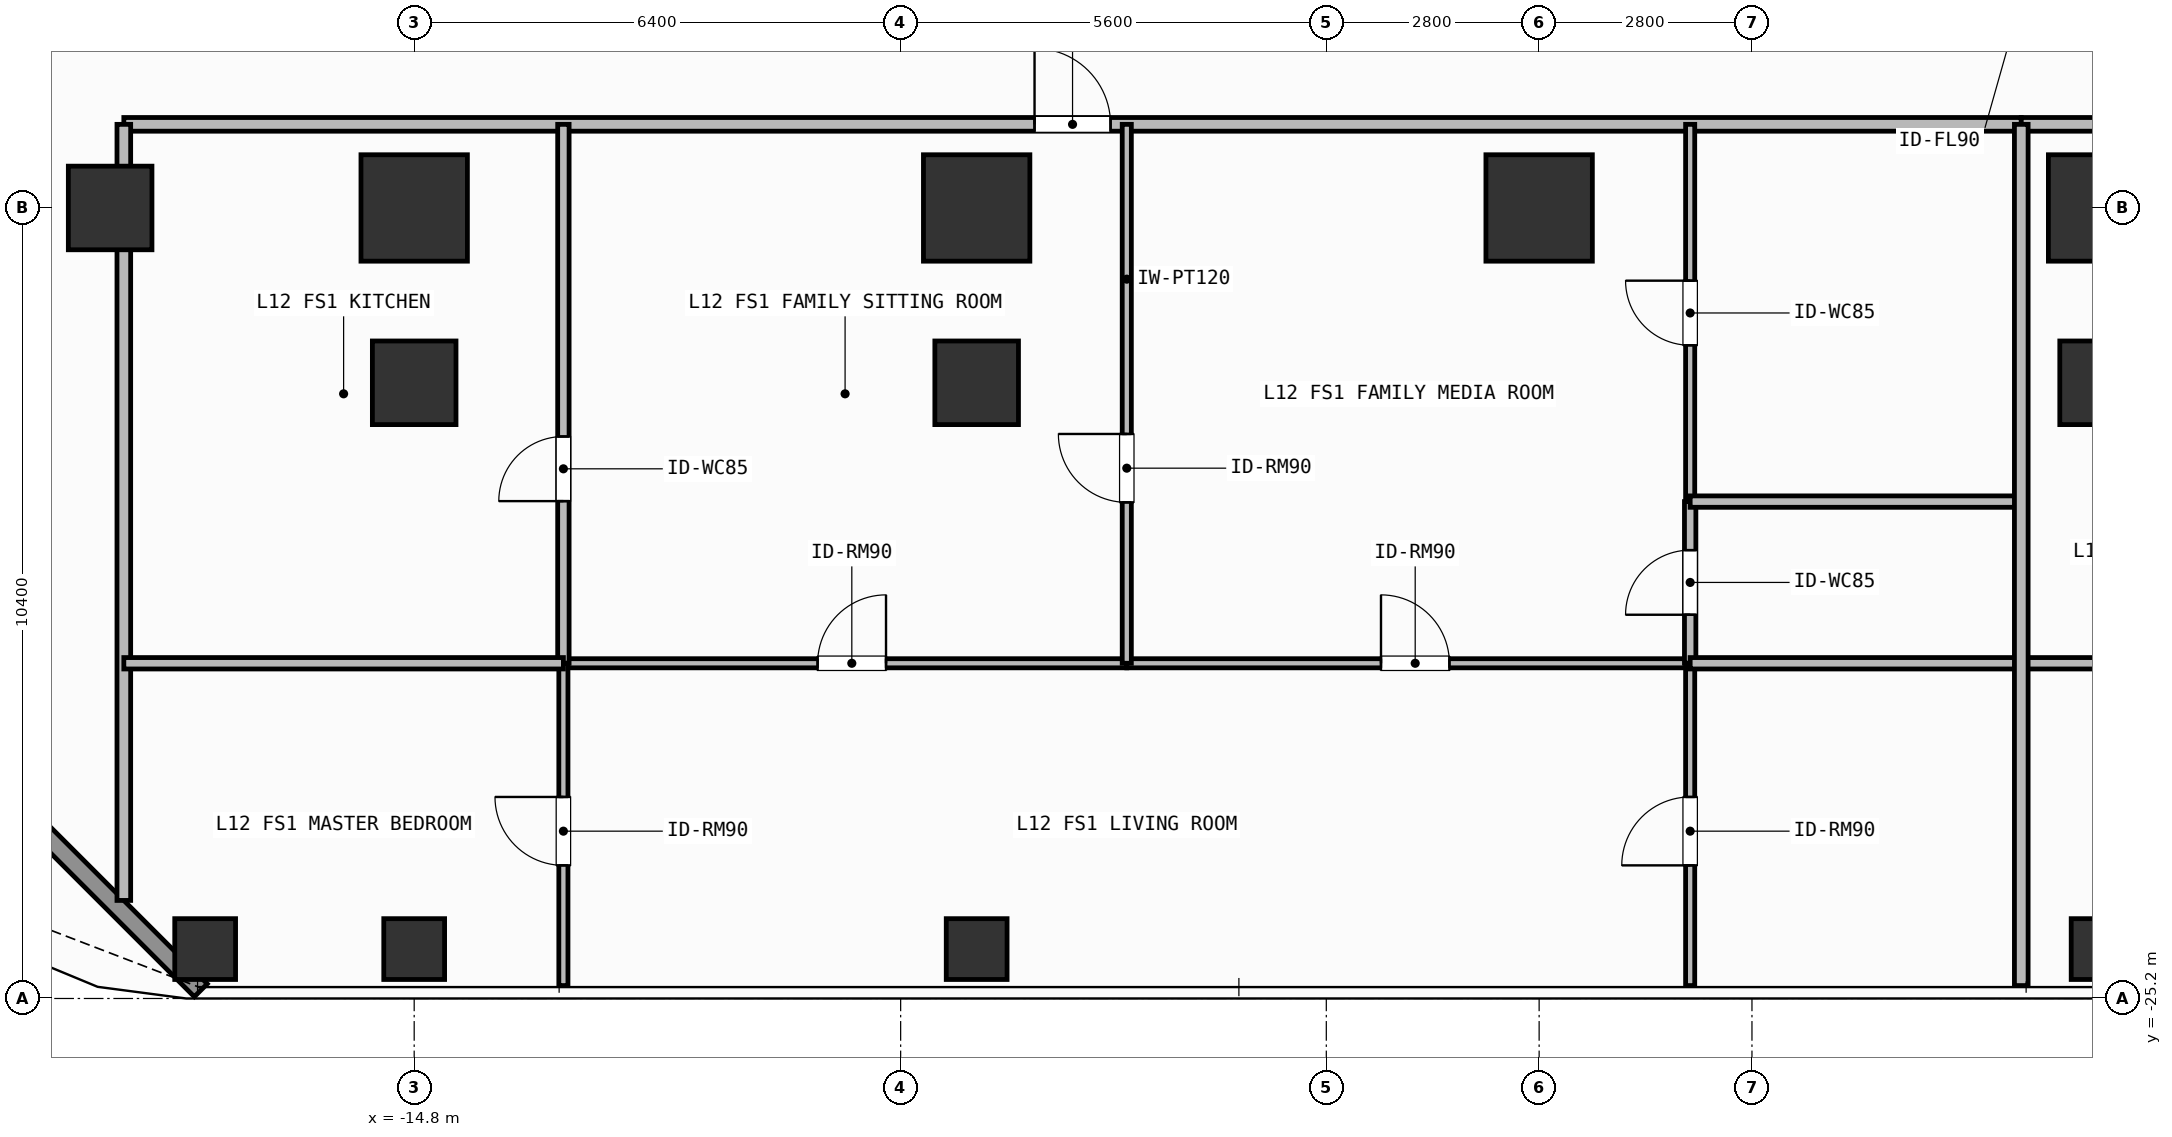
"""IFC4 building model, lengths in metres.
Left out: names, types, materials, properties, quantities, classifications, styles, units other than length and angle.
Written with IfcOpenShell. Run it as: python <this file> out.ifc"""

import sys

from ifc_helpers import new_model, si_unit, direction, frame, frame_2d, origin, origin_2d, place, context, subcontext, project, spatial, rectangle, hollow_rectangle, extrude, element, fill, save


model = new_model("IFC4")
c1 = context("Model", 3, precision=1e-05, world=origin(), true_north=direction((0.0, 1.0)))
c2 = subcontext(c1, "Body", "Model", "MODEL_VIEW")
j1 = project(units=[si_unit("LENGTHUNIT", "METRE"), si_unit("PLANEANGLEUNIT", "RADIAN")], contexts=[c1])
p1 = place(None, origin())
s1 = spatial("IfcSite", under=j1, at=p1, CompositionType="ELEMENT")
p2 = place(p1, origin())
s2 = spatial("IfcBuilding", under=s1, at=p2, CompositionType="ELEMENT")
p3 = place(p2, frame((0.0, 0.0, 46.2)))
s3 = spatial("IfcBuildingStorey", under=s2, at=p3, CompositionType="ELEMENT", Elevation=46.2)
for number, where, z_axis, x_axis in (
    (1, (-14.8, -14.8, 0.0), (0.0, 0.0, 1.0), (1.0, 0.0, 0.0)),
    (2, (-7.4, -14.8, 0.0), (0.0, 0.0, 1.0), (1.0, 0.0, 0.0)),
    (3, (0.0, -14.8, 0.0), (0.0, 0.0, 1.0), (1.0, 0.0, 0.0)),
    (4, (7.4, -14.8, 0.0), (0.0, 0.0, 1.0), (1.0, 0.0, 0.0)),
):
    element("IfcColumn", number, at=place(p3, frame(where, z_axis=z_axis, x_axis=x_axis)), inside=s3, PredefinedType="COLUMN", context=c2, shape_type="SweptSolid", body=[
        extrude(rectangle(XDim=1.4, YDim=1.4, at=origin_2d()), origin(), (0.0, 0.0, 1.0), 3.9),
    ])
for number, where, z_axis, x_axis in (
    (5, (-18.8, -14.8, 0.0), (0.0, 0.0, 1.0), (1.0, 0.0, 0.0)),
    (6, (-14.8, -17.1, 0.0), (0.0, 0.0, 1.0), (1.0, 0.0, 0.0)),
    (7, (-7.4, -17.1, 0.0), (0.0, 0.0, 1.0), (1.0, 0.0, 0.0)),
    (8, (7.4, -17.1, 0.0), (0.0, 0.0, 1.0), (1.0, 0.0, 0.0)),
):
    element("IfcColumn", number, at=place(p3, frame(where, z_axis=z_axis, x_axis=x_axis)), inside=s3, PredefinedType="COLUMN", context=c2, shape_type="SweptSolid", body=[
        extrude(rectangle(XDim=1.1, YDim=1.1, at=origin_2d()), origin(), (0.0, 0.0, 1.0), 3.9),
    ])
for number, where, z_axis, x_axis in (
    (9, (-17.55, -24.55, 0.0), (0.0, 0.0, 1.0), (1.0, 0.0, 0.0)),
    (10, (-14.8, -24.55, 0.0), (0.0, 0.0, 1.0), (1.0, 0.0, 0.0)),
    (11, (-7.4, -24.55, 0.0), (0.0, 0.0, 1.0), (1.0, 0.0, 0.0)),
    (12, (7.4, -24.55, 0.0), (0.0, 0.0, 1.0), (1.0, 0.0, 0.0)),
):
    element("IfcColumn", number, at=place(p3, frame(where, z_axis=z_axis, x_axis=x_axis)), inside=s3, PredefinedType="COLUMN", context=c2, shape_type="SweptSolid", body=[
        extrude(hollow_rectangle(XDim=0.8, YDim=0.8, WallThickness=0.036, at=origin_2d()), origin(), (0.0, 0.0, 1.0), 3.9),
    ])
p4 = place(p3, frame((-17.608, -25.092, 0.0), z_axis=(0.0, 0.0, 1.0), x_axis=(-0.707106781187, 0.707106781187, 0.0)))
e13 = element("IfcWall", 13, at=p4, inside=s3, PredefinedType="SOLIDWALL", context=c2, shape_type="SweptSolid", body=[
    extrude(rectangle(XDim=6.484, YDim=0.24, at=frame_2d((3.242, 0.0))), origin(), (0.0, 0.0, 1.0), 3.68),
])
p5 = place(p3, frame((-18.62, -13.7, 0.0), z_axis=(0.0, 0.0, 1.0), x_axis=(1.0, 0.0, 0.0)))
e14 = element("IfcWall", 14, at=p5, inside=s3, PredefinedType="PARTITIONING", context=c2, shape_type="SweptSolid", body=[
    extrude(rectangle(XDim=24.963, YDim=0.18, at=frame_2d((12.481, 0.0))), origin(), (0.0, 0.0, 1.0), 3.68),
])
p6 = place(p5, frame((11.981, 0.0, 0.0)))
e15 = element("IfcOpeningElement", 15, at=p6, cuts=e14, PredefinedType="OPENING", context=c2, shape_type="SweptSolid", body=[
    extrude(rectangle(XDim=1.0, YDim=2.2, at=frame_2d((0.5, 1.1))), frame((0.0, 0.1, 0.0), z_axis=(0.0, -1.0, 0.0), x_axis=(1.0, 0.0, 0.0)), (0.0, 0.0, 1.0), 0.2),
])
p7 = place(p3, frame((-12.837, -20.79, 0.0), z_axis=(0.0, 0.0, 1.0), x_axis=(1.0, 0.0, 0.0)))
e16 = element("IfcWall", 16, at=p7, inside=s3, PredefinedType="PARTITIONING", context=c2, shape_type="SweptSolid", body=[
    extrude(rectangle(XDim=7.412, YDim=0.12, at=frame_2d((3.706, 0.0))), origin(), (0.0, 0.0, 1.0), 3.68),
])
p8 = place(p7, frame((3.344, 0.0, 0.0)))
e17 = element("IfcOpeningElement", 17, at=p8, cuts=e16, PredefinedType="OPENING", context=c2, shape_type="SweptSolid", body=[
    extrude(rectangle(XDim=0.9, YDim=2.1, at=frame_2d((0.45, 1.05))), frame((0.0, 0.07, 0.0), z_axis=(0.0, -1.0, 0.0), x_axis=(1.0, 0.0, 0.0)), (0.0, 0.0, 1.0), 0.14),
])
p9 = place(p3, frame((-5.425, -20.79, 0.0), z_axis=(0.0, 0.0, 1.0), x_axis=(1.0, 0.0, 0.0)))
e18 = element("IfcWall", 18, at=p9, inside=s3, PredefinedType="PARTITIONING", context=c2, shape_type="SweptSolid", body=[
    extrude(rectangle(XDim=7.412, YDim=0.12, at=frame_2d((3.706, 0.0))), origin(), (0.0, 0.0, 1.0), 3.68),
])
p10 = place(p9, frame((3.344, 0.0, 0.0)))
e19 = element("IfcOpeningElement", 19, at=p10, cuts=e18, PredefinedType="OPENING", context=c2, shape_type="SweptSolid", body=[
    extrude(rectangle(XDim=0.9, YDim=2.1, at=frame_2d((0.45, 1.05))), frame((0.0, 0.07, 0.0), z_axis=(0.0, -1.0, 0.0), x_axis=(1.0, 0.0, 0.0)), (0.0, 0.0, 1.0), 0.14),
])
p11 = place(p3, frame((-5.425, -20.79, 0.0), z_axis=(0.0, 0.0, 1.0), x_axis=(0.0, 1.0, 0.0)))
e20 = element("IfcWall", 20, at=p11, inside=s3, PredefinedType="PARTITIONING", context=c2, shape_type="SweptSolid", body=[
    extrude(rectangle(XDim=7.09, YDim=0.12, at=frame_2d((3.545, 0.0))), origin(), (0.0, 0.0, 1.0), 3.68),
])
p12 = place(p11, frame((2.117, 0.0, 0.0)))
e21 = element("IfcOpeningElement", 21, at=p12, cuts=e20, PredefinedType="OPENING", context=c2, shape_type="SweptSolid", body=[
    extrude(rectangle(XDim=0.9, YDim=2.1, at=frame_2d((0.45, 1.05))), frame((0.0, 0.07, 0.0), z_axis=(0.0, -1.0, 0.0), x_axis=(1.0, 0.0, 0.0)), (0.0, 0.0, 1.0), 0.14),
])
p13 = place(p3, frame((-12.837, -20.79, 0.0), z_axis=(0.0, 0.0, 1.0), x_axis=(0.0, 1.0, 0.0)))
e22 = element("IfcWall", 22, at=p13, inside=s3, PredefinedType="PARTITIONING", context=c2, shape_type="SweptSolid", body=[
    extrude(rectangle(XDim=7.09, YDim=0.15, at=frame_2d((3.545, 0.0))), origin(), (0.0, 0.0, 1.0), 3.68),
])
p14 = place(p13, frame((2.133, 0.0, 0.0)))
e23 = element("IfcOpeningElement", 23, at=p14, cuts=e22, PredefinedType="OPENING", context=c2, shape_type="SweptSolid", body=[
    extrude(rectangle(XDim=0.85, YDim=2.1, at=frame_2d((0.425, 1.05))), frame((0.0, 0.085, 0.0), z_axis=(0.0, -1.0, 0.0), x_axis=(1.0, 0.0, 0.0)), (0.0, 0.0, 1.0), 0.17),
])
p15 = place(p3, frame((-12.837, -25.03, 0.0), z_axis=(0.0, 0.0, 1.0), x_axis=(0.0, 1.0, 0.0)))
e24 = element("IfcWall", 24, at=p15, inside=s3, PredefinedType="PARTITIONING", context=c2, shape_type="SweptSolid", body=[
    extrude(rectangle(XDim=4.24, YDim=0.12, at=frame_2d((2.12, 0.0))), origin(), (0.0, 0.0, 1.0), 3.68),
])
p16 = place(p15, frame((1.581, 0.0, 0.0)))
e25 = element("IfcOpeningElement", 25, at=p16, cuts=e24, PredefinedType="OPENING", context=c2, shape_type="SweptSolid", body=[
    extrude(rectangle(XDim=0.9, YDim=2.1, at=frame_2d((0.45, 1.05))), frame((0.0, 0.07, 0.0), z_axis=(0.0, -1.0, 0.0), x_axis=(1.0, 0.0, 0.0)), (0.0, 0.0, 1.0), 0.14),
])
p17 = place(p3, frame((1.987, -20.79, 0.0), z_axis=(0.0, 0.0, 1.0), x_axis=(0.0, 1.0, 0.0)))
e26 = element("IfcWall", 26, at=p17, inside=s3, PredefinedType="PARTITIONING", context=c2, shape_type="SweptSolid", body=[
    extrude(rectangle(XDim=2.127, YDim=0.15, at=frame_2d((1.063, 0.0))), origin(), (0.0, 0.0, 1.0), 3.68),
])
p18 = place(p17, frame((0.638, 0.0, 0.0)))
e27 = element("IfcOpeningElement", 27, at=p18, cuts=e26, PredefinedType="OPENING", context=c2, shape_type="SweptSolid", body=[
    extrude(rectangle(XDim=0.85, YDim=2.1, at=frame_2d((0.425, 1.05))), frame((0.0, 0.085, 0.0), z_axis=(0.0, -1.0, 0.0), x_axis=(1.0, 0.0, 0.0)), (0.0, 0.0, 1.0), 0.17),
])
p19 = place(p3, frame((1.987, -18.663, 0.0), z_axis=(0.0, 0.0, 1.0), x_axis=(0.0, 1.0, 0.0)))
e28 = element("IfcWall", 28, at=p19, inside=s3, PredefinedType="PARTITIONING", context=c2, shape_type="SweptSolid", body=[
    extrude(rectangle(XDim=4.963, YDim=0.12, at=frame_2d((2.481, 0.0))), origin(), (0.0, 0.0, 1.0), 3.68),
])
p20 = place(p19, frame((2.056, 0.0, 0.0)))
e29 = element("IfcOpeningElement", 29, at=p20, cuts=e28, PredefinedType="OPENING", context=c2, shape_type="SweptSolid", body=[
    extrude(rectangle(XDim=0.85, YDim=2.1, at=frame_2d((0.425, 1.05))), frame((0.0, 0.07, 0.0), z_axis=(0.0, -1.0, 0.0), x_axis=(1.0, 0.0, 0.0)), (0.0, 0.0, 1.0), 0.14),
])
p21 = place(p3, frame((1.987, -25.03, 0.0), z_axis=(0.0, 0.0, 1.0), x_axis=(0.0, 1.0, 0.0)))
e30 = element("IfcWall", 30, at=p21, inside=s3, PredefinedType="PARTITIONING", context=c2, shape_type="SweptSolid", body=[
    extrude(rectangle(XDim=4.24, YDim=0.12, at=frame_2d((2.12, 0.0))), origin(), (0.0, 0.0, 1.0), 3.68),
])
p22 = place(p21, frame((1.581, 0.0, 0.0)))
e31 = element("IfcOpeningElement", 31, at=p22, cuts=e30, PredefinedType="OPENING", context=c2, shape_type="SweptSolid", body=[
    extrude(rectangle(XDim=0.9, YDim=2.1, at=frame_2d((0.45, 1.05))), frame((0.0, 0.07, 0.0), z_axis=(0.0, -1.0, 0.0), x_axis=(1.0, 0.0, 0.0)), (0.0, 0.0, 1.0), 0.14),
])
p23 = place(p3, frame((6.343, -13.7, 0.0), z_axis=(0.0, 0.0, 1.0), x_axis=(1.0, 0.0, 0.0)))
e32 = element("IfcWall", 32, at=p23, inside=s3, PredefinedType="PARTITIONING", context=c2, shape_type="SweptSolid", body=[
    extrude(rectangle(XDim=18.077, YDim=0.18, at=frame_2d((9.039, 0.0))), origin(), (0.0, 0.0, 1.0), 3.68),
])
p24 = place(p23, frame((9.252, 0.0, 0.0)))
e33 = element("IfcOpeningElement", 33, at=p24, cuts=e32, PredefinedType="OPENING", context=c2, shape_type="SweptSolid", body=[
    extrude(rectangle(XDim=1.0, YDim=2.2, at=frame_2d((0.5, 1.1))), frame((0.0, 0.1, 0.0), z_axis=(0.0, -1.0, 0.0), x_axis=(1.0, 0.0, 0.0)), (0.0, 0.0, 1.0), 0.2),
])
p25 = place(p3, frame((-18.62, -23.91, 0.0), z_axis=(0.0, 0.0, 1.0), x_axis=(0.0, 1.0, 0.0)))
e34 = element("IfcWall", 34, at=p25, inside=s3, PredefinedType="PARTITIONING", context=c2, shape_type="SweptSolid", body=[
    extrude(rectangle(XDim=10.21, YDim=0.18, at=frame_2d((5.105, 0.0))), origin(), (0.0, 0.0, 1.0), 3.082),
])
p26 = place(p3, frame((-18.62, -20.79, 0.0), z_axis=(0.0, 0.0, 1.0), x_axis=(1.0, 0.0, 0.0)))
e35 = element("IfcWall", 35, at=p26, inside=s3, PredefinedType="PARTITIONING", context=c2, shape_type="SweptSolid", body=[
    extrude(rectangle(XDim=5.783, YDim=0.15, at=frame_2d((2.892, 0.0))), origin(), (0.0, 0.0, 1.0), 3.68),
])
for number, where, z_axis, x_axis in (
    (36, (1.987, -18.663, 0.0), (0.0, 0.0, 1.0), (1.0, 0.0, 0.0)),
    (37, (1.987, -20.79, 0.0), (0.0, 0.0, 1.0), (1.0, 0.0, 0.0)),
):
    element("IfcWall", number, at=place(p3, frame(where, z_axis=z_axis, x_axis=x_axis)), inside=s3, PredefinedType="PARTITIONING", context=c2, shape_type="SweptSolid", body=[
        extrude(rectangle(XDim=4.356, YDim=0.15, at=frame_2d((2.178, 0.0))), origin(), (0.0, 0.0, 1.0), 3.68),
    ])
p27 = place(p3, frame((6.343, -20.79, 0.0), z_axis=(0.0, 0.0, 1.0), x_axis=(1.0, 0.0, 0.0)))
e38 = element("IfcWall", 38, at=p27, inside=s3, PredefinedType="PARTITIONING", context=c2, shape_type="SweptSolid", body=[
    extrude(rectangle(XDim=6.032, YDim=0.15, at=frame_2d((3.016, 0.0))), origin(), (0.0, 0.0, 1.0), 3.68),
])
p28 = place(p3, frame((6.343, -25.03, 0.0), z_axis=(0.0, 0.0, 1.0), x_axis=(0.0, 1.0, 0.0)))
e39 = element("IfcWall", 39, at=p28, inside=s3, PredefinedType="PARTITIONING", context=c2, shape_type="SweptSolid", body=[
    extrude(rectangle(XDim=11.33, YDim=0.18, at=frame_2d((5.665, 0.0))), origin(), (0.0, 0.0, 1.0), 3.68),
])
p29 = place(p6, origin())
e40 = element("IfcDoor", 40, at=p29, inside=s3, OperationType="SINGLE_SWING_LEFT", PredefinedType="DOOR", context=c2, shape_type="SweptSolid", body=[
    extrude(rectangle(XDim=1.0, YDim=2.2, at=frame_2d((0.5, 1.1))), frame((0.0, 0.025, 0.0), z_axis=(0.0, -1.0, 0.0), x_axis=(1.0, 0.0, 0.0)), (0.0, 0.0, 1.0), 0.05),
])
fill(e15, e40)
p30 = place(p8, origin())
e41 = element("IfcDoor", 41, at=p30, inside=s3, OperationType="SINGLE_SWING_RIGHT", PredefinedType="DOOR", context=c2, shape_type="SweptSolid", body=[
    extrude(rectangle(XDim=0.9, YDim=2.1, at=frame_2d((0.45, 1.05))), frame((0.0, 0.025, 0.0), z_axis=(0.0, -1.0, 0.0), x_axis=(1.0, 0.0, 0.0)), (0.0, 0.0, 1.0), 0.05),
])
fill(e17, e41)
p31 = place(p10, origin())
e42 = element("IfcDoor", 42, at=p31, inside=s3, OperationType="SINGLE_SWING_LEFT", PredefinedType="DOOR", context=c2, shape_type="SweptSolid", body=[
    extrude(rectangle(XDim=0.9, YDim=2.1, at=frame_2d((0.45, 1.05))), frame((0.0, 0.025, 0.0), z_axis=(0.0, -1.0, 0.0), x_axis=(1.0, 0.0, 0.0)), (0.0, 0.0, 1.0), 0.05),
])
fill(e19, e42)
p32 = place(p12, origin())
e43 = element("IfcDoor", 43, at=p32, inside=s3, OperationType="SINGLE_SWING_RIGHT", PredefinedType="DOOR", context=c2, shape_type="SweptSolid", body=[
    extrude(rectangle(XDim=0.9, YDim=2.1, at=frame_2d((0.45, 1.05))), frame((0.0, 0.025, 0.0), z_axis=(0.0, -1.0, 0.0), x_axis=(1.0, 0.0, 0.0)), (0.0, 0.0, 1.0), 0.05),
])
fill(e21, e43)
p33 = place(p14, origin())
e44 = element("IfcDoor", 44, at=p33, inside=s3, OperationType="SINGLE_SWING_LEFT", PredefinedType="DOOR", context=c2, shape_type="SweptSolid", body=[
    extrude(rectangle(XDim=0.85, YDim=2.1, at=frame_2d((0.425, 1.05))), frame((0.0, 0.025, 0.0), z_axis=(0.0, -1.0, 0.0), x_axis=(1.0, 0.0, 0.0)), (0.0, 0.0, 1.0), 0.05),
])
fill(e23, e44)
p34 = place(p16, origin())
e45 = element("IfcDoor", 45, at=p34, inside=s3, OperationType="SINGLE_SWING_RIGHT", PredefinedType="DOOR", context=c2, shape_type="SweptSolid", body=[
    extrude(rectangle(XDim=0.9, YDim=2.1, at=frame_2d((0.45, 1.05))), frame((0.0, 0.025, 0.0), z_axis=(0.0, -1.0, 0.0), x_axis=(1.0, 0.0, 0.0)), (0.0, 0.0, 1.0), 0.05),
])
fill(e25, e45)
p35 = place(p18, origin())
e46 = element("IfcDoor", 46, at=p35, inside=s3, OperationType="SINGLE_SWING_LEFT", PredefinedType="DOOR", context=c2, shape_type="SweptSolid", body=[
    extrude(rectangle(XDim=0.85, YDim=2.1, at=frame_2d((0.425, 1.05))), frame((0.0, 0.025, 0.0), z_axis=(0.0, -1.0, 0.0), x_axis=(1.0, 0.0, 0.0)), (0.0, 0.0, 1.0), 0.05),
])
fill(e27, e46)
p36 = place(p20, origin())
e47 = element("IfcDoor", 47, at=p36, inside=s3, OperationType="SINGLE_SWING_RIGHT", PredefinedType="DOOR", context=c2, shape_type="SweptSolid", body=[
    extrude(rectangle(XDim=0.85, YDim=2.1, at=frame_2d((0.425, 1.05))), frame((0.0, 0.025, 0.0), z_axis=(0.0, -1.0, 0.0), x_axis=(1.0, 0.0, 0.0)), (0.0, 0.0, 1.0), 0.05),
])
fill(e29, e47)
p37 = place(p22, origin())
e48 = element("IfcDoor", 48, at=p37, inside=s3, OperationType="SINGLE_SWING_LEFT", PredefinedType="DOOR", context=c2, shape_type="SweptSolid", body=[
    extrude(rectangle(XDim=0.9, YDim=2.1, at=frame_2d((0.45, 1.05))), frame((0.0, 0.025, 0.0), z_axis=(0.0, -1.0, 0.0), x_axis=(1.0, 0.0, 0.0)), (0.0, 0.0, 1.0), 0.05),
])
fill(e31, e48)
save(model, sys.argv[1])
